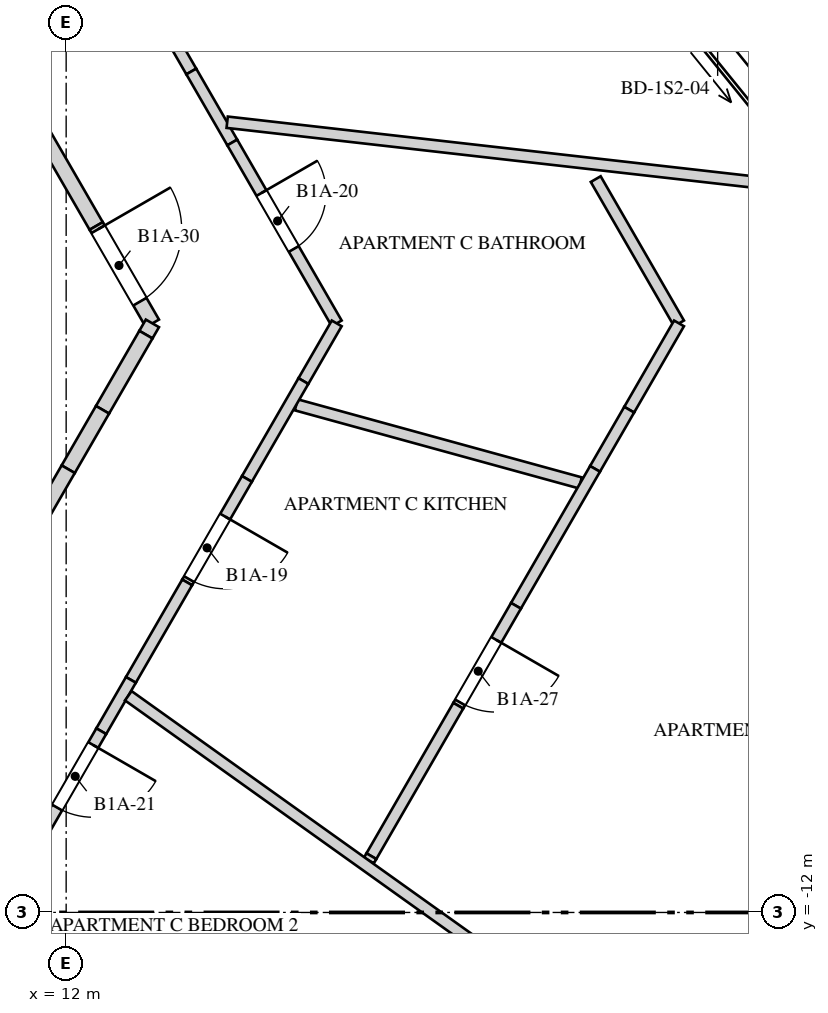
"""IFC4 building model, lengths in metres.
Left out: names, types, materials, properties, quantities, classifications, styles, units other than length and angle.
Written with IfcOpenShell. Run it as: python <this file> out.ifc"""

import sys

from ifc_helpers import new_model, si_unit, direction, frame, frame_2d, origin, place, context, subcontext, project, spatial, polyline, rectangle, outline, extrude, element, fill, save


model = new_model("IFC4")
c1 = context("Model", 3, precision=1e-05, world=origin(), true_north=direction((0.0, 1.0)))
c2 = subcontext(c1, "Body", "Model", "MODEL_VIEW")
j1 = project(units=[si_unit("LENGTHUNIT", "METRE"), si_unit("PLANEANGLEUNIT", "RADIAN")], contexts=[c1])
p1 = place(None, origin())
s1 = spatial("IfcSite", under=j1, at=p1, CompositionType="ELEMENT")
p2 = place(p1, origin())
s2 = spatial("IfcBuilding", under=s1, at=p2, CompositionType="ELEMENT")
p3 = place(p2, frame((0.0, 0.0, 51.2)))
s3 = spatial("IfcBuildingStorey", under=s2, at=p3, CompositionType="ELEMENT", Elevation=51.2)
p4 = place(p3, frame((21.321, -1.541, 0.0), z_axis=(0.0, 0.0, 1.0), x_axis=(-0.629257171563, 0.777197151331, 0.0)))
e1 = element("IfcWall", 1, at=p4, inside=s3, PredefinedType="SOLIDWALL", context=c2, shape_type="SweptSolid", body=[
    extrude(rectangle(XDim=2.383, YDim=0.3, at=frame_2d((1.191, 0.0))), origin(), (0.0, 0.0, 1.0), 3.3),
])
p5 = place(p4, frame((0.342, 0.0, 0.0)))
e2 = element("IfcOpeningElement", 2, at=p5, cuts=e1, PredefinedType="OPENING", context=c2, shape_type="SweptSolid", body=[
    extrude(rectangle(XDim=1.7, YDim=2.4, at=frame_2d((0.85, 1.2))), frame((0.0, 0.16, 0.0), z_axis=(0.0, -1.0, 0.0), x_axis=(1.0, 0.0, 0.0)), (0.0, 0.0, 1.0), 0.32),
])
p6 = place(p3, frame((11.808, 2.248, 0.0), z_axis=(0.0, 0.0, 1.0), x_axis=(0.500002145574, -0.866024165033, 0.0)))
e3 = element("IfcWall", 3, at=p6, inside=s3, PredefinedType="PARTITIONING", context=c2, shape_type="SweptSolid", body=[
    extrude(rectangle(XDim=3.677, YDim=0.15, at=frame_2d((1.839, 0.0))), origin(), (0.0, 0.0, 1.0), 3.65),
])
p7 = place(p6, frame((1.604, 0.0, 0.0)))
e4 = element("IfcOpeningElement", 4, at=p7, cuts=e3, PredefinedType="OPENING", context=c2, shape_type="SweptSolid", body=[
    extrude(rectangle(XDim=0.95, YDim=2.4, at=frame_2d((0.475, 1.2))), frame((0.0, 0.085, 0.0), z_axis=(0.0, -1.0, 0.0), x_axis=(1.0, 0.0, 0.0)), (0.0, 0.0, 1.0), 0.17),
])
p8 = place(p3, frame((13.646, -0.936, 0.0), z_axis=(0.0, 0.0, 1.0), x_axis=(0.499938053331, -0.866061165757, 0.0)))
e5 = element("IfcWall", 5, at=p8, inside=s3, PredefinedType="PARTITIONING", context=c2, shape_type="SweptSolid", body=[
    extrude(rectangle(XDim=1.078, YDim=0.15, at=frame_2d((0.539, 0.0))), origin(), (0.0, 0.0, 1.0), 2.55),
])
p9 = place(p3, frame((14.186, -1.87, 0.0), z_axis=(0.0, 0.0, 1.0), x_axis=(0.499999305434, -0.866025804792, 0.0)))
e6 = element("IfcWall", 6, at=p9, inside=s3, PredefinedType="PARTITIONING", context=c2, shape_type="SweptSolid", body=[
    extrude(rectangle(XDim=2.748, YDim=0.15, at=frame_2d((1.374, 0.0))), origin(), (0.0, 0.0, 1.0), 3.65),
])
p10 = place(p9, frame((0.768, 0.0, 0.0)))
e7 = element("IfcOpeningElement", 7, at=p10, cuts=e6, PredefinedType="OPENING", context=c2, shape_type="SweptSolid", body=[
    extrude(rectangle(XDim=0.85, YDim=2.4, at=frame_2d((0.425, 1.2))), frame((0.0, 0.085, 0.0), z_axis=(0.0, -1.0, 0.0), x_axis=(1.0, 0.0, 0.0)), (0.0, 0.0, 1.0), 0.17),
])
p11 = place(p3, frame((14.118, -1.604, 0.0), z_axis=(0.0, 0.0, 1.0), x_axis=(0.993609026083, -0.112876495722, 0.0)))
e8 = element("IfcWall", 8, at=p11, inside=s3, PredefinedType="PARTITIONING", context=c2, shape_type="SweptSolid", body=[
    extrude(rectangle(XDim=10.892, YDim=0.15, at=frame_2d((5.446, 0.0))), origin(), (0.0, 0.0, 1.0), 2.55),
])
p12 = place(p3, frame((15.028, -5.322, 0.0), z_axis=(0.0, 0.0, 1.0), x_axis=(0.964256110782, -0.26497198497, 0.0)))
e9 = element("IfcWall", 9, at=p12, inside=s3, PredefinedType="PARTITIONING", context=c2, shape_type="SweptSolid", body=[
    extrude(rectangle(XDim=3.875, YDim=0.15, at=frame_2d((1.938, 0.0))), origin(), (0.0, 0.0, 1.0), 3.65),
])
p13 = place(p3, frame((15.56, -4.25, 0.0), z_axis=(0.0, 0.0, 1.0), x_axis=(-0.500003763204, -0.866023231087, 0.0)))
e10 = element("IfcWall", 10, at=p13, inside=s3, PredefinedType="PARTITIONING", context=c2, shape_type="SweptSolid", body=[
    extrude(rectangle(XDim=0.876, YDim=0.15, at=frame_2d((0.438, 0.0))), origin(), (0.0, 0.0, 1.0), 2.55),
])
p14 = place(p3, frame((15.121, -5.009, 0.0), z_axis=(0.0, 0.0, 1.0), x_axis=(-0.500025795397, -0.866010510293, 0.0)))
e11 = element("IfcWall", 11, at=p14, inside=s3, PredefinedType="PARTITIONING", context=c2, shape_type="SweptSolid", body=[
    extrude(rectangle(XDim=1.486, YDim=0.15, at=frame_2d((0.743, 0.0))), origin(), (0.0, 0.0, 1.0), 3.65),
])
p15 = place(p3, frame((14.378, -6.296, 0.0), z_axis=(0.0, 0.0, 1.0), x_axis=(-0.499946456463, -0.866056314953, 0.0)))
e12 = element("IfcWall", 12, at=p15, inside=s3, PredefinedType="PARTITIONING", context=c2, shape_type="SweptSolid", body=[
    extrude(outline(polyline([(0.0, 0.0), (1.573, 0.0), (1.572, 3.65), (0.878, 3.65), (0.878, 2.55), (0.0, 2.55), (0.0, 0.0)])), frame((0.0, 0.075, 0.0), z_axis=(0.0, -1.0, 0.0), x_axis=(1.0, 0.0, 0.0)), (0.0, 0.0, 1.0), 0.15),
])
p16 = place(p15, frame((0.572, 0.0, 0.0)))
e13 = element("IfcOpeningElement", 13, at=p16, cuts=e12, PredefinedType="OPENING", context=c2, shape_type="SweptSolid", body=[
    extrude(rectangle(XDim=0.95, YDim=2.4, at=frame_2d((0.475, 1.2))), frame((0.0, 0.085, 0.0), z_axis=(0.0, -1.0, 0.0), x_axis=(1.0, 0.0, 0.0)), (0.0, 0.0, 1.0), 0.17),
])
p17 = place(p3, frame((13.592, -7.658, 0.0), z_axis=(0.0, 0.0, 1.0), x_axis=(-0.49996987118, -0.866042797968, 0.0)))
e14 = element("IfcWall", 14, at=p17, inside=s3, PredefinedType="PARTITIONING", context=c2, shape_type="SweptSolid", body=[
    extrude(rectangle(XDim=1.48, YDim=0.15, at=frame_2d((0.74, 0.0))), origin(), (0.0, 0.0, 1.0), 3.65),
])
p18 = place(p3, frame((12.852, -8.94, 0.0), z_axis=(0.0, 0.0, 1.0), x_axis=(-0.500011542666, -0.866018739521, 0.0)))
e15 = element("IfcWall", 15, at=p18, inside=s3, PredefinedType="PARTITIONING", context=c2, shape_type="SweptSolid", body=[
    extrude(rectangle(XDim=0.78, YDim=0.15, at=frame_2d((0.39, 0.0))), origin(), (0.0, 0.0, 1.0), 2.75),
])
p19 = place(p3, frame((12.462, -9.615, 0.0), z_axis=(0.0, 0.0, 1.0), x_axis=(-0.499993265928, -0.866029291668, 0.0)))
e16 = element("IfcWall", 16, at=p19, inside=s3, PredefinedType="PARTITIONING", context=c2, shape_type="SweptSolid", body=[
    extrude(rectangle(XDim=2.003, YDim=0.15, at=frame_2d((1.001, 0.0))), origin(), (0.0, 0.0, 1.0), 3.65),
])
p20 = place(p19, frame((0.211, 0.0, 0.0)))
e17 = element("IfcOpeningElement", 17, at=p20, cuts=e16, PredefinedType="OPENING", context=c2, shape_type="SweptSolid", body=[
    extrude(rectangle(XDim=0.95, YDim=2.4, at=frame_2d((0.475, 1.2))), frame((0.0, 0.085, 0.0), z_axis=(0.0, -1.0, 0.0), x_axis=(1.0, 0.0, 0.0)), (0.0, 0.0, 1.0), 0.17),
])
p21 = place(p3, frame((18.967, -2.352, 0.0), z_axis=(0.0, 0.0, 1.0), x_axis=(0.499973180286, -0.8660408876, 0.0)))
e18 = element("IfcWall", 18, at=p21, inside=s3, PredefinedType="PARTITIONING", context=c2, shape_type="SweptSolid", body=[
    extrude(rectangle(XDim=2.191, YDim=0.15, at=frame_2d((1.096, 0.0))), origin(), (0.0, 0.0, 1.0), 3.65),
])
p22 = place(p3, frame((20.063, -4.25, 0.0), z_axis=(0.0, 0.0, 1.0), x_axis=(-0.500103875667, -0.865965422833, 0.0)))
e19 = element("IfcWall", 19, at=p22, inside=s3, PredefinedType="PARTITIONING", context=c2, shape_type="SweptSolid", body=[
    extrude(rectangle(XDim=1.311, YDim=0.15, at=frame_2d((0.656, 0.0))), origin(), (0.0, 0.0, 1.0), 3.65),
])
p23 = place(p3, frame((19.407, -5.385, 0.0), z_axis=(0.0, 0.0, 1.0), x_axis=(-0.499965372359, -0.866045395139, 0.0)))
e20 = element("IfcWall", 20, at=p23, inside=s3, PredefinedType="PARTITIONING", context=c2, shape_type="SweptSolid", body=[
    extrude(rectangle(XDim=0.899, YDim=0.15, at=frame_2d((0.449, 0.0))), origin(), (0.0, 0.0, 1.0), 2.55),
])
p24 = place(p3, frame((18.958, -6.164, 0.0), z_axis=(0.0, 0.0, 1.0), x_axis=(-0.499939227269, -0.866060488094, 0.0)))
e21 = element("IfcWall", 21, at=p24, inside=s3, PredefinedType="PARTITIONING", context=c2, shape_type="SweptSolid", body=[
    extrude(rectangle(XDim=2.08, YDim=0.15, at=frame_2d((1.04, 0.0))), origin(), (0.0, 0.0, 1.0), 3.65),
])
p25 = place(p3, frame((17.918, -7.965, 0.0), z_axis=(0.0, 0.0, 1.0), x_axis=(-0.500047204294, -0.865998148658, 0.0)))
e22 = element("IfcWall", 22, at=p25, inside=s3, PredefinedType="PARTITIONING", context=c2, shape_type="SweptSolid", body=[
    extrude(outline(polyline([(0.0, 0.0), (1.518, 0.0), (1.518, 3.65), (0.878, 3.65), (0.878, 2.55), (0.0, 2.55), (0.0, 0.0)])), frame((0.0, 0.075, 0.0), z_axis=(0.0, -1.0, 0.0), x_axis=(1.0, 0.0, 0.0)), (0.0, 0.0, 1.0), 0.15),
])
p26 = place(p25, frame((0.518, 0.0, 0.0)))
e23 = element("IfcOpeningElement", 23, at=p26, cuts=e22, PredefinedType="OPENING", context=c2, shape_type="SweptSolid", body=[
    extrude(rectangle(XDim=0.95, YDim=2.4, at=frame_2d((0.475, 1.2))), frame((0.0, 0.085, 0.0), z_axis=(0.0, -1.0, 0.0), x_axis=(1.0, 0.0, 0.0)), (0.0, 0.0, 1.0), 0.17),
])
p27 = place(p3, frame((17.159, -9.28, 0.0), z_axis=(0.0, 0.0, 1.0), x_axis=(-0.499987504325, -0.866032618045, 0.0)))
e24 = element("IfcWall", 24, at=p27, inside=s3, PredefinedType="PARTITIONING", context=c2, shape_type="SweptSolid", body=[
    extrude(rectangle(XDim=2.286, YDim=0.15, at=frame_2d((1.143, 0.0))), origin(), (0.0, 0.0, 1.0), 3.65),
])
p28 = place(p3, frame((16.016, -11.26, 0.0), z_axis=(0.0, 0.0, 1.0), x_axis=(-0.498541023162, -0.866866107438, 0.0)))
e25 = element("IfcWall", 25, at=p28, inside=s3, PredefinedType="PARTITIONING", context=c2, shape_type="SweptSolid", body=[
    extrude(rectangle(XDim=0.066, YDim=0.15, at=frame_2d((0.033, 0.0))), origin(), (0.0, 0.0, 1.0), 2.75),
])
p29 = place(p3, frame((20.431, -14.583, 0.0), z_axis=(0.0, 0.0, 1.0), x_axis=(-0.813913318796, 0.580986324699, 0.0)))
e26 = element("IfcWall", 26, at=p29, inside=s3, PredefinedType="PARTITIONING", context=c2, shape_type="SweptSolid", body=[
    extrude(rectangle(XDim=9.354, YDim=0.15, at=frame_2d((4.677, 0.0))), origin(), (0.0, 0.0, 1.0), 2.75),
])
p30 = place(p3, frame((11.618, -1.624, 0.0), z_axis=(0.0, 0.0, 1.0), x_axis=(0.50011257031, -0.86596040153, 0.0)))
e27 = element("IfcWall", 27, at=p30, inside=s3, PredefinedType="SOLIDWALL", context=c2, shape_type="SweptSolid", body=[
    extrude(rectangle(XDim=1.553, YDim=0.2, at=frame_2d((0.776, 0.0))), origin(), (0.0, 0.0, 1.0), 3.65),
])
p31 = place(p3, frame((12.395, -2.969, 0.0), z_axis=(0.0, 0.0, 1.0), x_axis=(0.499936694431, -0.866061950187, 0.0)))
e28 = element("IfcWall", 28, at=p31, inside=s3, PredefinedType="SOLIDWALL", context=c2, shape_type="SweptSolid", body=[
    extrude(outline(polyline([(0.0, 0.0), (1.48, 0.0), (1.479, 2.55), (0.409, 2.55), (0.409, 3.65), (0.0, 3.65), (0.0, 0.0)])), frame((0.0, 0.1, 0.0), z_axis=(0.0, -1.0, 0.0), x_axis=(1.0, 0.0, 0.0)), (0.0, 0.0, 1.0), 0.2),
])
p32 = place(p31, frame((0.05, 0.0, 0.0)))
e29 = element("IfcOpeningElement", 29, at=p32, cuts=e28, PredefinedType="OPENING", context=c2, shape_type="SweptSolid", body=[
    extrude(rectangle(XDim=1.1, YDim=2.4, at=frame_2d((0.55, 1.2))), frame((0.0, 0.11, 0.0), z_axis=(0.0, -1.0, 0.0), x_axis=(1.0, 0.0, 0.0)), (0.0, 0.0, 1.0), 0.22),
])
p33 = place(p3, frame((13.135, -4.25, 0.0), z_axis=(0.0, 0.0, 1.0), x_axis=(-0.500586455622, -0.865686548612, 0.0)))
e30 = element("IfcWall", 30, at=p33, inside=s3, PredefinedType="SOLIDWALL", context=c2, shape_type="SweptSolid", body=[
    extrude(rectangle(XDim=0.171, YDim=0.2, at=frame_2d((0.085, 0.0))), origin(), (0.0, 0.0, 1.0), 2.55),
])
p34 = place(p3, frame((13.049, -4.398, 0.0), z_axis=(0.0, 0.0, 1.0), x_axis=(-0.499889102667, -0.866089420923, 0.0)))
e31 = element("IfcWall", 31, at=p34, inside=s3, PredefinedType="SOLIDWALL", context=c2, shape_type="SweptSolid", body=[
    extrude(rectangle(XDim=1.141, YDim=0.2, at=frame_2d((0.571, 0.0))), origin(), (0.0, 0.0, 1.0), 3.65),
])
p35 = place(p3, frame((12.479, -5.387, 0.0), z_axis=(0.0, 0.0, 1.0), x_axis=(-0.500151474942, -0.865937932021, 0.0)))
e32 = element("IfcWall", 32, at=p35, inside=s3, PredefinedType="SOLIDWALL", context=c2, shape_type="SweptSolid", body=[
    extrude(rectangle(XDim=0.903, YDim=0.2, at=frame_2d((0.452, 0.0))), origin(), (0.0, 0.0, 1.0), 2.55),
])
p36 = place(p3, frame((12.027, -6.169, 0.0), z_axis=(0.0, 0.0, 1.0), x_axis=(-0.499900037626, -0.866083109396, 0.0)))
e33 = element("IfcWall", 33, at=p36, inside=s3, PredefinedType="SOLIDWALL", context=c2, shape_type="SweptSolid", body=[
    extrude(rectangle(XDim=1.745, YDim=0.2, at=frame_2d((0.873, 0.0))), origin(), (0.0, 0.0, 1.0), 3.65),
])
p37 = place(p5, origin())
e34 = element("IfcDoor", 34, at=p37, inside=s3, OperationType="SLIDING_TO_LEFT", PredefinedType="DOOR", context=c2, shape_type="SweptSolid", body=[
    extrude(rectangle(XDim=1.7, YDim=2.4, at=frame_2d((0.85, 1.2))), frame((0.0, 0.025, 0.0), z_axis=(0.0, -1.0, 0.0), x_axis=(1.0, 0.0, 0.0)), (0.0, 0.0, 1.0), 0.05),
])
fill(e2, e34)
p38 = place(p16, origin())
e35 = element("IfcDoor", 35, at=p38, inside=s3, OperationType="SINGLE_SWING_LEFT", PredefinedType="DOOR", context=c2, shape_type="SweptSolid", body=[
    extrude(rectangle(XDim=0.95, YDim=2.4, at=frame_2d((0.475, 1.2))), frame((0.0, 0.025, 0.0), z_axis=(0.0, -1.0, 0.0), x_axis=(1.0, 0.0, 0.0)), (0.0, 0.0, 1.0), 0.05),
])
fill(e13, e35)
p39 = place(p10, origin())
e36 = element("IfcDoor", 36, at=p39, inside=s3, OperationType="SINGLE_SWING_RIGHT", PredefinedType="DOOR", context=c2, shape_type="SweptSolid", body=[
    extrude(rectangle(XDim=0.85, YDim=2.4, at=frame_2d((0.425, 1.2))), frame((0.0, 0.025, 0.0), z_axis=(0.0, -1.0, 0.0), x_axis=(1.0, 0.0, 0.0)), (0.0, 0.0, 1.0), 0.05),
])
fill(e7, e36)
p40 = place(p20, origin())
e37 = element("IfcDoor", 37, at=p40, inside=s3, OperationType="SINGLE_SWING_LEFT", PredefinedType="DOOR", context=c2, shape_type="SweptSolid", body=[
    extrude(rectangle(XDim=0.95, YDim=2.4, at=frame_2d((0.475, 1.2))), frame((0.0, 0.025, 0.0), z_axis=(0.0, -1.0, 0.0), x_axis=(1.0, 0.0, 0.0)), (0.0, 0.0, 1.0), 0.05),
])
fill(e17, e37)
p41 = place(p26, origin())
e38 = element("IfcDoor", 38, at=p41, inside=s3, OperationType="SINGLE_SWING_LEFT", PredefinedType="DOOR", context=c2, shape_type="SweptSolid", body=[
    extrude(rectangle(XDim=0.95, YDim=2.4, at=frame_2d((0.475, 1.2))), frame((0.0, 0.025, 0.0), z_axis=(0.0, -1.0, 0.0), x_axis=(1.0, 0.0, 0.0)), (0.0, 0.0, 1.0), 0.05),
])
fill(e23, e38)
p42 = place(p32, origin())
e39 = element("IfcDoor", 39, at=p42, inside=s3, OperationType="SINGLE_SWING_RIGHT", PredefinedType="DOOR", context=c2, shape_type="SweptSolid", body=[
    extrude(rectangle(XDim=1.1, YDim=2.4, at=frame_2d((0.55, 1.2))), frame((0.0, 0.025, 0.0), z_axis=(0.0, -1.0, 0.0), x_axis=(1.0, 0.0, 0.0)), (0.0, 0.0, 1.0), 0.05),
])
fill(e29, e39)
save(model, sys.argv[1])
